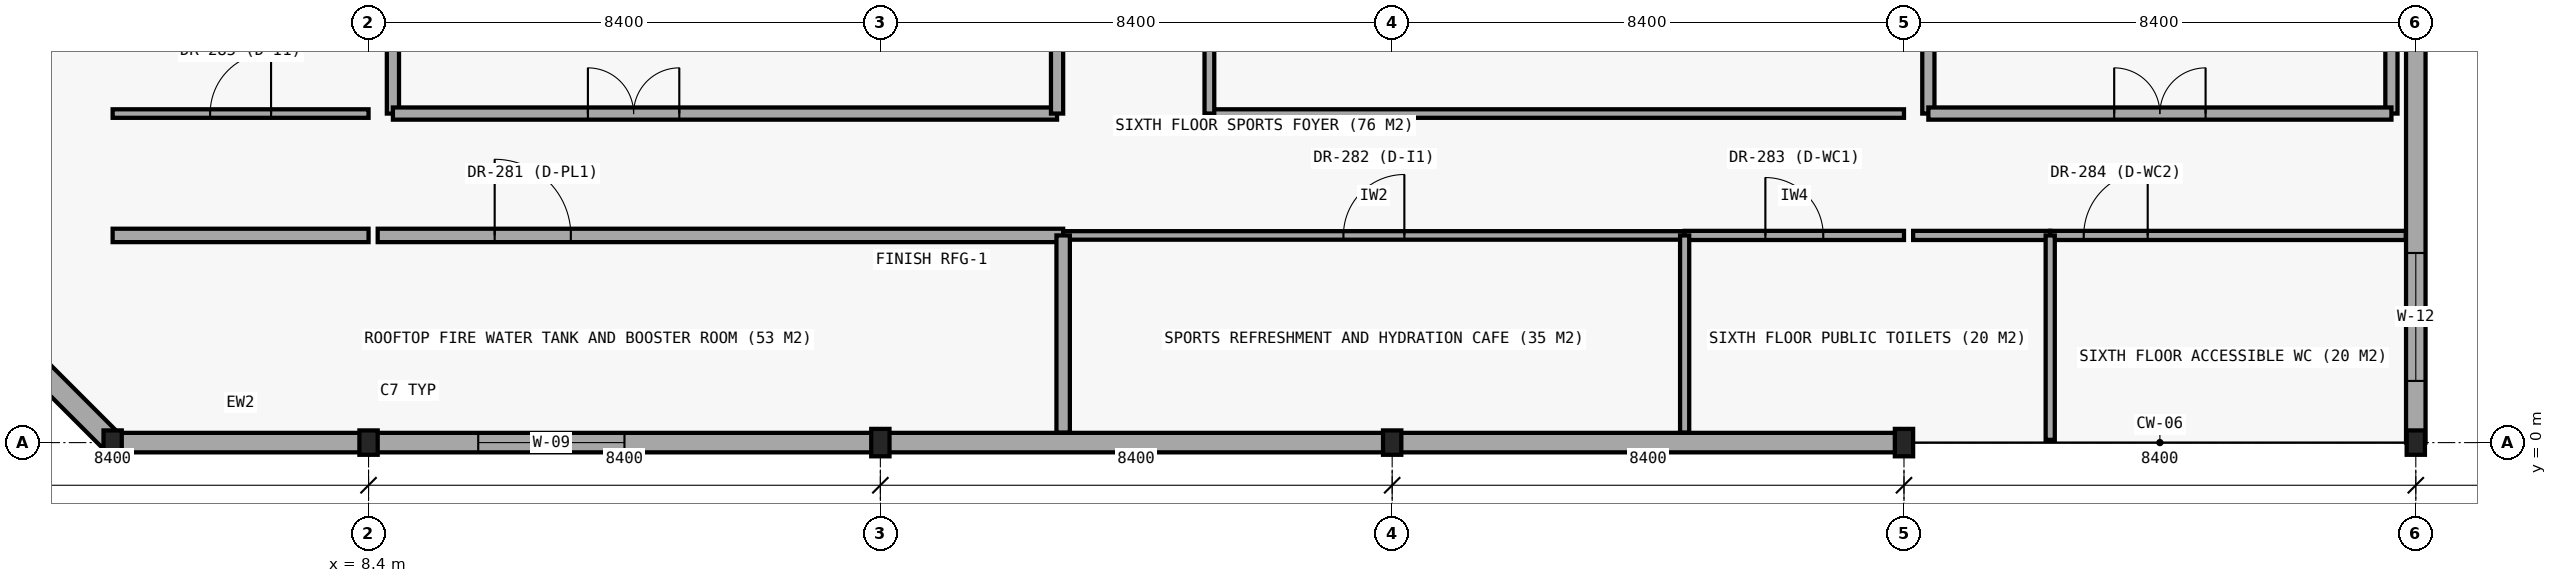
"""IFC4 building model, lengths in metres.
Left out: names, types, materials, properties, quantities, classifications, styles, units other than length and angle.
Written with IfcOpenShell. Run it as: python <this file> out.ifc"""

import sys

from ifc_helpers import new_model, si_unit, direction, frame, frame_2d, origin, origin_2d, place, context, subcontext, project, spatial, rectangle, i_section, extrude, element, fill, save


model = new_model("IFC4")
c1 = context("Model", 3, precision=1e-05, world=origin(), true_north=direction((0.0, 1.0)))
c2 = subcontext(c1, "Body", "Model", "MODEL_VIEW")
j1 = project(units=[si_unit("LENGTHUNIT", "METRE"), si_unit("PLANEANGLEUNIT", "RADIAN")], contexts=[c1])
p1 = place(None, origin())
s1 = spatial("IfcSite", under=j1, at=p1, CompositionType="ELEMENT")
p2 = place(p1, origin())
s2 = spatial("IfcBuilding", under=s1, at=p2, CompositionType="ELEMENT")
p3 = place(p2, frame((0.0, 0.0, 26.4)))
s3 = spatial("IfcBuildingStorey", under=s2, at=p3, CompositionType="ELEMENT", Elevation=26.4)
p4 = place(p3, frame((8.4, 0.0, 0.0), z_axis=(0.0, 0.0, 1.0), x_axis=(1.0, 0.0, 0.0)))
e1 = element("IfcColumn", 1, at=p4, inside=s3, PredefinedType="COLUMN", context=c2, shape_type="SweptSolid", body=[
    extrude(i_section(OverallWidth=0.3, OverallDepth=0.4, WebThickness=0.013, FlangeThickness=0.024, FilletRadius=0.027, at=origin_2d()), origin(), (0.0, 0.0, 1.0), 4.63),
])
p5 = place(p3, frame((16.8, 0.0, 0.0), z_axis=(0.0, 0.0, 1.0), x_axis=(1.0, 0.0, 0.0)))
e2 = element("IfcColumn", 2, at=p5, inside=s3, PredefinedType="COLUMN", context=c2, shape_type="SweptSolid", body=[
    extrude(i_section(OverallWidth=0.3, OverallDepth=0.45, WebThickness=0.014, FlangeThickness=0.026, FilletRadius=0.027, at=origin_2d()), origin(), (0.0, 0.0, 1.0), 4.63),
])
p6 = place(p3, frame((25.2, 0.0, 0.0), z_axis=(0.0, 0.0, 1.0), x_axis=(1.0, 0.0, 0.0)))
e3 = element("IfcColumn", 3, at=p6, inside=s3, PredefinedType="COLUMN", context=c2, shape_type="SweptSolid", body=[
    extrude(i_section(OverallWidth=0.3, OverallDepth=0.4, WebThickness=0.013, FlangeThickness=0.024, FilletRadius=0.027, at=origin_2d()), origin(), (0.0, 0.0, 1.0), 4.63),
])
p7 = place(p3, frame((33.6, 0.0, 0.0), z_axis=(0.0, 0.0, 1.0), x_axis=(1.0, 0.0, 0.0)))
e4 = element("IfcColumn", 4, at=p7, inside=s3, PredefinedType="COLUMN", context=c2, shape_type="SweptSolid", body=[
    extrude(i_section(OverallWidth=0.3, OverallDepth=0.45, WebThickness=0.014, FlangeThickness=0.026, FilletRadius=0.027, at=origin_2d()), origin(), (0.0, 0.0, 1.0), 4.63),
])
for number, where, z_axis, x_axis in (
    (5, (42.0, 0.0, 0.0), (0.0, 0.0, 1.0), (1.0, 0.0, 0.0)),
    (6, (4.2, 0.0, 0.0), (0.0, 0.0, 1.0), (1.0, 0.0, 0.0)),
):
    element("IfcColumn", number, at=place(p3, frame(where, z_axis=z_axis, x_axis=x_axis)), inside=s3, PredefinedType="COLUMN", context=c2, shape_type="SweptSolid", body=[
        extrude(i_section(OverallWidth=0.3, OverallDepth=0.4, WebThickness=0.013, FlangeThickness=0.024, FilletRadius=0.027, at=origin_2d()), origin(), (0.0, 0.0, 1.0), 4.63),
    ])
p8 = place(p3, frame((4.2, 0.0, 0.0), z_axis=(0.0, 0.0, 1.0), x_axis=(1.0, 0.0, 0.0)))
e7 = element("IfcWall", 7, at=p8, inside=s3, PredefinedType="STANDARD", context=c2, shape_type="SweptSolid", body=[
    extrude(rectangle(XDim=4.2, YDim=0.32, at=frame_2d((2.1, 0.0))), origin(), (0.0, 0.0, 1.0), 4.06),
])
p9 = place(p3, frame((8.4, 0.0, 0.0), z_axis=(0.0, 0.0, 1.0), x_axis=(1.0, 0.0, 0.0)))
e8 = element("IfcWall", 8, at=p9, inside=s3, PredefinedType="STANDARD", context=c2, shape_type="SweptSolid", body=[
    extrude(rectangle(XDim=8.4, YDim=0.32, at=frame_2d((4.2, 0.0))), origin(), (0.0, 0.0, 1.0), 4.06),
])
p10 = place(p9, frame((1.8, 0.0, 0.85)))
e9 = element("IfcOpeningElement", 9, at=p10, cuts=e8, PredefinedType="OPENING", context=c2, shape_type="SweptSolid", body=[
    extrude(rectangle(XDim=2.4, YDim=2.6, at=frame_2d((1.2, 1.3))), frame((0.0, 0.17, 0.0), z_axis=(0.0, -1.0, 0.0), x_axis=(1.0, 0.0, 0.0)), (0.0, 0.0, 1.0), 0.34),
])
p11 = place(p3, frame((16.8, 0.0, 0.0), z_axis=(0.0, 0.0, 1.0), x_axis=(1.0, 0.0, 0.0)))
e10 = element("IfcWall", 10, at=p11, inside=s3, PredefinedType="STANDARD", context=c2, shape_type="SweptSolid", body=[
    extrude(rectangle(XDim=8.4, YDim=0.32, at=frame_2d((4.2, 0.0))), origin(), (0.0, 0.0, 1.0), 4.01),
])
p12 = place(p3, frame((25.2, 0.0, 0.0), z_axis=(0.0, 0.0, 1.0), x_axis=(1.0, 0.0, 0.0)))
e11 = element("IfcWall", 11, at=p12, inside=s3, PredefinedType="STANDARD", context=c2, shape_type="SweptSolid", body=[
    extrude(rectangle(XDim=8.4, YDim=0.32, at=frame_2d((4.2, 0.0))), origin(), (0.0, 0.0, 1.0), 4.06),
])
p13 = place(p3, frame((42.0, 0.0, 0.0), z_axis=(0.0, 0.0, 1.0), x_axis=(0.0, 1.0, 0.0)))
e12 = element("IfcWall", 12, at=p13, inside=s3, PredefinedType="STANDARD", context=c2, shape_type="SweptSolid", body=[
    extrude(rectangle(XDim=8.4, YDim=0.32, at=frame_2d((4.2, 0.0))), origin(), (0.0, 0.0, 1.0), 4.06),
])
p14 = place(p13, frame((1.012, 0.0, 0.9)))
e13 = element("IfcOpeningElement", 13, at=p14, cuts=e12, PredefinedType="OPENING", context=c2, shape_type="SweptSolid", body=[
    extrude(rectangle(XDim=2.1, YDim=2.1, at=frame_2d((1.05, 1.05))), frame((0.0, 0.17, 0.0), z_axis=(0.0, -1.0, 0.0), x_axis=(1.0, 0.0, 0.0)), (0.0, 0.0, 1.0), 0.34),
])
p15 = place(p3, frame((0.0, 4.2, 0.0), z_axis=(0.0, 0.0, 1.0), x_axis=(0.707106781187, -0.707106781187, 0.0)))
e14 = element("IfcWall", 14, at=p15, inside=s3, PredefinedType="STANDARD", context=c2, shape_type="SweptSolid", body=[
    extrude(rectangle(XDim=5.94, YDim=0.36, at=frame_2d((2.97, 0.0))), origin(), (0.0, 0.0, 1.0), 4.06),
])
p16 = place(p15, frame((2.5, 0.0, 1.0)))
e15 = element("IfcOpeningElement", 15, at=p16, cuts=e14, PredefinedType="OPENING", context=c2, shape_type="SweptSolid", body=[
    extrude(rectangle(XDim=0.75, YDim=1.5, at=frame_2d((0.375, 0.75))), frame((0.0, 0.19, 0.0), z_axis=(0.0, -1.0, 0.0), x_axis=(1.0, 0.0, 0.0)), (0.0, 0.0, 1.0), 0.38),
])
p17 = place(p3, frame((8.8, 5.4, 0.0), z_axis=(0.0, 0.0, 1.0), x_axis=(0.0, 1.0, 0.0)))
e16 = element("IfcWall", 16, at=p17, inside=s3, PredefinedType="PARTITIONING", context=c2, shape_type="SweptSolid", body=[
    extrude(rectangle(XDim=2.85, YDim=0.2, at=frame_2d((1.425, 0.0))), origin(), (0.0, 0.0, 1.0), 4.12),
])
p18 = place(p3, frame((8.8, 5.4, 0.0), z_axis=(0.0, 0.0, 1.0), x_axis=(1.0, 0.0, 0.0)))
e17 = element("IfcWall", 17, at=p18, inside=s3, PredefinedType="PARTITIONING", context=c2, shape_type="SweptSolid", body=[
    extrude(rectangle(XDim=10.9, YDim=0.2, at=frame_2d((5.45, 0.0))), origin(), (0.0, 0.0, 1.0), 4.12),
])
p19 = place(p18, frame((3.2, 0.0, 0.0)))
e18 = element("IfcOpeningElement", 18, at=p19, cuts=e17, PredefinedType="OPENING", context=c2, shape_type="SweptSolid", body=[
    extrude(rectangle(XDim=1.5, YDim=2.2, at=frame_2d((0.75, 1.1))), frame((0.0, 0.11, 0.0), z_axis=(0.0, -1.0, 0.0), x_axis=(1.0, 0.0, 0.0)), (0.0, 0.0, 1.0), 0.22),
])
p20 = place(p3, frame((19.7, 5.4, 0.0), z_axis=(0.0, 0.0, 1.0), x_axis=(0.0, 1.0, 0.0)))
e19 = element("IfcWall", 19, at=p20, inside=s3, PredefinedType="PARTITIONING", context=c2, shape_type="SweptSolid", body=[
    extrude(rectangle(XDim=9.6, YDim=0.2, at=frame_2d((4.8, 0.0))), origin(), (0.0, 0.0, 1.0), 4.12),
])
for number, where, z_axis, x_axis in (
    (20, (34.0, 5.4, 0.0), (0.0, 0.0, 1.0), (0.0, 1.0, 0.0)),
    (21, (41.6, 5.4, 0.0), (0.0, 0.0, 1.0), (0.0, 1.0, 0.0)),
):
    element("IfcWall", number, at=place(p3, frame(where, z_axis=z_axis, x_axis=x_axis)), inside=s3, PredefinedType="PARTITIONING", context=c2, shape_type="SweptSolid", body=[
        extrude(rectangle(XDim=2.85, YDim=0.2, at=frame_2d((1.425, 0.0))), origin(), (0.0, 0.0, 1.0), 4.06),
    ])
p21 = place(p3, frame((34.0, 5.4, 0.0), z_axis=(0.0, 0.0, 1.0), x_axis=(1.0, 0.0, 0.0)))
e22 = element("IfcWall", 22, at=p21, inside=s3, PredefinedType="PARTITIONING", context=c2, shape_type="SweptSolid", body=[
    extrude(rectangle(XDim=7.6, YDim=0.2, at=frame_2d((3.8, 0.0))), origin(), (0.0, 0.0, 1.0), 4.12),
])
p22 = place(p21, frame((3.05, 0.0, 0.0)))
e23 = element("IfcOpeningElement", 23, at=p22, cuts=e22, PredefinedType="OPENING", context=c2, shape_type="SweptSolid", body=[
    extrude(rectangle(XDim=1.5, YDim=2.2, at=frame_2d((0.75, 1.1))), frame((0.0, 0.11, 0.0), z_axis=(0.0, -1.0, 0.0), x_axis=(1.0, 0.0, 0.0)), (0.0, 0.0, 1.0), 0.22),
])
p23 = place(p3, frame((4.2, 3.4, 0.0), z_axis=(0.0, 0.0, 1.0), x_axis=(1.0, 0.0, 0.0)))
e24 = element("IfcWall", 24, at=p23, inside=s3, PredefinedType="PARTITIONING", context=c2, shape_type="SweptSolid", body=[
    extrude(rectangle(XDim=4.2, YDim=0.22, at=frame_2d((2.1, 0.0))), origin(), (0.0, 0.0, 1.0), 4.1),
])
p24 = place(p3, frame((8.55, 3.4, 0.0), z_axis=(0.0, 0.0, 1.0), x_axis=(1.0, 0.0, 0.0)))
e25 = element("IfcWall", 25, at=p24, inside=s3, PredefinedType="PARTITIONING", context=c2, shape_type="SweptSolid", body=[
    extrude(rectangle(XDim=11.25, YDim=0.22, at=frame_2d((5.625, 0.0))), origin(), (0.0, 0.0, 1.0), 4.1),
])
p25 = place(p24, frame((1.92, 0.0, 0.0)))
e26 = element("IfcOpeningElement", 26, at=p25, cuts=e25, PredefinedType="OPENING", context=c2, shape_type="SweptSolid", body=[
    extrude(rectangle(XDim=1.25, YDim=2.2, at=frame_2d((0.625, 1.1))), frame((0.0, 0.12, 0.0), z_axis=(0.0, -1.0, 0.0), x_axis=(1.0, 0.0, 0.0)), (0.0, 0.0, 1.0), 0.24),
])
p26 = place(p3, frame((19.8, 3.4, 0.0), z_axis=(0.0, 0.0, 1.0), x_axis=(1.0, 0.0, 0.0)))
e27 = element("IfcWall", 27, at=p26, inside=s3, PredefinedType="PARTITIONING", context=c2, shape_type="SweptSolid", body=[
    extrude(rectangle(XDim=10.2, YDim=0.14, at=frame_2d((5.1, 0.0))), origin(), (0.0, 0.0, 1.0), 4.1),
])
p27 = place(p26, frame((4.6, 0.0, 0.0)))
e28 = element("IfcOpeningElement", 28, at=p27, cuts=e27, PredefinedType="OPENING", context=c2, shape_type="SweptSolid", body=[
    extrude(rectangle(XDim=1.0, YDim=2.15, at=frame_2d((0.5, 1.075))), frame((0.0, 0.08, 0.0), z_axis=(0.0, -1.0, 0.0), x_axis=(1.0, 0.0, 0.0)), (0.0, 0.0, 1.0), 0.16),
])
p28 = place(p3, frame((30.0, 3.4, 0.0), z_axis=(0.0, 0.0, 1.0), x_axis=(1.0, 0.0, 0.0)))
e29 = element("IfcWall", 29, at=p28, inside=s3, PredefinedType="PARTITIONING", context=c2, shape_type="SweptSolid", body=[
    extrude(rectangle(XDim=3.6, YDim=0.15, at=frame_2d((1.8, 0.0))), origin(), (0.0, 0.0, 1.0), 4.1),
])
p29 = place(p28, frame((1.325, 0.0, 0.0)))
e30 = element("IfcOpeningElement", 30, at=p29, cuts=e29, PredefinedType="OPENING", context=c2, shape_type="SweptSolid", body=[
    extrude(rectangle(XDim=0.95, YDim=2.1, at=frame_2d((0.475, 1.05))), frame((0.0, 0.085, 0.0), z_axis=(0.0, -1.0, 0.0), x_axis=(1.0, 0.0, 0.0)), (0.0, 0.0, 1.0), 0.17),
])
p30 = place(p3, frame((33.75, 3.4, 0.0), z_axis=(0.0, 0.0, 1.0), x_axis=(1.0, 0.0, 0.0)))
e31 = element("IfcWall", 31, at=p30, inside=s3, PredefinedType="PARTITIONING", context=c2, shape_type="SweptSolid", body=[
    extrude(rectangle(XDim=2.25, YDim=0.15, at=frame_2d((1.125, 0.0))), origin(), (0.0, 0.0, 1.0), 4.1),
])
p31 = place(p3, frame((36.0, 3.4, 0.0), z_axis=(0.0, 0.0, 1.0), x_axis=(1.0, 0.0, 0.0)))
e32 = element("IfcWall", 32, at=p31, inside=s3, PredefinedType="PARTITIONING", context=c2, shape_type="SweptSolid", body=[
    extrude(rectangle(XDim=5.835, YDim=0.15, at=frame_2d((2.917, 0.0))), origin(), (0.0, 0.0, 1.0), 4.1),
])
p32 = place(p31, frame((0.55, 0.0, 0.0)))
e33 = element("IfcOpeningElement", 33, at=p32, cuts=e32, PredefinedType="OPENING", context=c2, shape_type="SweptSolid", body=[
    extrude(rectangle(XDim=1.05, YDim=2.15, at=frame_2d((0.525, 1.075))), frame((0.0, 0.085, 0.0), z_axis=(0.0, -1.0, 0.0), x_axis=(1.0, 0.0, 0.0)), (0.0, 0.0, 1.0), 0.17),
])
p33 = place(p3, frame((4.2, 5.4, 0.0), z_axis=(0.0, 0.0, 1.0), x_axis=(1.0, 0.0, 0.0)))
e34 = element("IfcWall", 34, at=p33, inside=s3, PredefinedType="PARTITIONING", context=c2, shape_type="SweptSolid", body=[
    extrude(rectangle(XDim=4.2, YDim=0.14, at=frame_2d((2.1, 0.0))), origin(), (0.0, 0.0, 1.0), 4.1),
])
p34 = place(p33, frame((1.6, 0.0, 0.0)))
e35 = element("IfcOpeningElement", 35, at=p34, cuts=e34, PredefinedType="OPENING", context=c2, shape_type="SweptSolid", body=[
    extrude(rectangle(XDim=1.0, YDim=2.15, at=frame_2d((0.5, 1.075))), frame((0.0, 0.08, 0.0), z_axis=(0.0, -1.0, 0.0), x_axis=(1.0, 0.0, 0.0)), (0.0, 0.0, 1.0), 0.16),
])
p35 = place(p3, frame((22.2, 5.4, 0.0), z_axis=(0.0, 0.0, 1.0), x_axis=(1.0, 0.0, 0.0)))
e36 = element("IfcWall", 36, at=p35, inside=s3, PredefinedType="PARTITIONING", context=c2, shape_type="SweptSolid", body=[
    extrude(rectangle(XDim=11.4, YDim=0.14, at=frame_2d((5.7, 0.0))), origin(), (0.0, 0.0, 1.0), 4.1),
])
p36 = place(p3, frame((19.8, 0.165, 0.0), z_axis=(0.0, 0.0, 1.0), x_axis=(0.0, 1.0, 0.0)))
e37 = element("IfcWall", 37, at=p36, inside=s3, PredefinedType="PARTITIONING", context=c2, shape_type="SweptSolid", body=[
    extrude(rectangle(XDim=3.235, YDim=0.22, at=frame_2d((1.617, 0.0))), origin(), (0.0, 0.0, 1.0), 4.1),
])
p37 = place(p3, frame((22.2, 5.4, 0.0), z_axis=(0.0, 0.0, 1.0), x_axis=(0.0, 1.0, 0.0)))
e38 = element("IfcWall", 38, at=p37, inside=s3, PredefinedType="PARTITIONING", context=c2, shape_type="SweptSolid", body=[
    extrude(rectangle(XDim=16.6, YDim=0.16, at=frame_2d((8.3, 0.0))), origin(), (0.0, 0.0, 1.0), 4.1),
])
p38 = place(p37, frame((4.72, 0.0, 0.0)))
e39 = element("IfcOpeningElement", 39, at=p38, cuts=e38, PredefinedType="OPENING", context=c2, shape_type="SweptSolid", body=[
    extrude(rectangle(XDim=1.0, YDim=2.15, at=frame_2d((0.5, 1.075))), frame((0.0, 0.09, 0.0), z_axis=(0.0, -1.0, 0.0), x_axis=(1.0, 0.0, 0.0)), (0.0, 0.0, 1.0), 0.18),
])
p39 = place(p3, frame((30.0, 0.165, 0.0), z_axis=(0.0, 0.0, 1.0), x_axis=(0.0, 1.0, 0.0)))
e40 = element("IfcWall", 40, at=p39, inside=s3, PredefinedType="PARTITIONING", context=c2, shape_type="SweptSolid", body=[
    extrude(rectangle(XDim=3.235, YDim=0.15, at=frame_2d((1.617, 0.0))), origin(), (0.0, 0.0, 1.0), 4.1),
])
p40 = place(p3, frame((36.0, 0.045, 0.0), z_axis=(0.0, 0.0, 1.0), x_axis=(0.0, 1.0, 0.0)))
e41 = element("IfcWall", 41, at=p40, inside=s3, PredefinedType="PARTITIONING", context=c2, shape_type="SweptSolid", body=[
    extrude(rectangle(XDim=3.355, YDim=0.15, at=frame_2d((1.677, 0.0))), origin(), (0.0, 0.0, 1.0), 4.1),
])
p41 = place(p10, origin())
e42 = element("IfcWindow", 42, at=p41, inside=s3, PartitioningType="SINGLE_PANEL", PredefinedType="WINDOW", context=c2, shape_type="SweptSolid", body=[
    extrude(rectangle(XDim=2.4, YDim=2.6, at=frame_2d((1.2, 1.3))), frame((0.0, 0.03, 0.0), z_axis=(0.0, -1.0, 0.0), x_axis=(1.0, 0.0, 0.0)), (0.0, 0.0, 1.0), 0.06),
])
fill(e9, e42)
p42 = place(p14, origin())
e43 = element("IfcWindow", 43, at=p42, inside=s3, PartitioningType="SINGLE_PANEL", PredefinedType="WINDOW", context=c2, shape_type="SweptSolid", body=[
    extrude(rectangle(XDim=2.1, YDim=2.1, at=frame_2d((1.05, 1.05))), frame((0.0, 0.03, 0.0), z_axis=(0.0, -1.0, 0.0), x_axis=(1.0, 0.0, 0.0)), (0.0, 0.0, 1.0), 0.06),
])
fill(e13, e43)
p43 = place(p19, origin())
e44 = element("IfcDoor", 44, at=p43, inside=s3, OperationType="DOUBLE_DOOR_SINGLE_SWING", PredefinedType="DOOR", context=c2, shape_type="SweptSolid", body=[
    extrude(rectangle(XDim=1.5, YDim=2.2, at=frame_2d((0.75, 1.1))), frame((0.0, 0.025, 0.0), z_axis=(0.0, -1.0, 0.0), x_axis=(1.0, 0.0, 0.0)), (0.0, 0.0, 1.0), 0.05),
])
fill(e18, e44)
p44 = place(p22, origin())
e45 = element("IfcDoor", 45, at=p44, inside=s3, OperationType="DOUBLE_DOOR_SINGLE_SWING", PredefinedType="DOOR", context=c2, shape_type="SweptSolid", body=[
    extrude(rectangle(XDim=1.5, YDim=2.2, at=frame_2d((0.75, 1.1))), frame((0.0, 0.025, 0.0), z_axis=(0.0, -1.0, 0.0), x_axis=(1.0, 0.0, 0.0)), (0.0, 0.0, 1.0), 0.05),
])
fill(e23, e45)
p45 = place(p25, origin())
e46 = element("IfcDoor", 46, at=p45, inside=s3, OperationType="SINGLE_SWING_LEFT", PredefinedType="DOOR", context=c2, shape_type="SweptSolid", body=[
    extrude(rectangle(XDim=1.25, YDim=2.2, at=frame_2d((0.625, 1.1))), frame((0.0, 0.025, 0.0), z_axis=(0.0, -1.0, 0.0), x_axis=(1.0, 0.0, 0.0)), (0.0, 0.0, 1.0), 0.05),
])
fill(e26, e46)
p46 = place(p27, origin())
e47 = element("IfcDoor", 47, at=p46, inside=s3, OperationType="SINGLE_SWING_RIGHT", PredefinedType="DOOR", context=c2, shape_type="SweptSolid", body=[
    extrude(rectangle(XDim=1.0, YDim=2.15, at=frame_2d((0.5, 1.075))), frame((0.0, 0.025, 0.0), z_axis=(0.0, -1.0, 0.0), x_axis=(1.0, 0.0, 0.0)), (0.0, 0.0, 1.0), 0.05),
])
fill(e28, e47)
p47 = place(p29, origin())
e48 = element("IfcDoor", 48, at=p47, inside=s3, OperationType="SINGLE_SWING_LEFT", PredefinedType="DOOR", context=c2, shape_type="SweptSolid", body=[
    extrude(rectangle(XDim=0.95, YDim=2.1, at=frame_2d((0.475, 1.05))), frame((0.0, 0.025, 0.0), z_axis=(0.0, -1.0, 0.0), x_axis=(1.0, 0.0, 0.0)), (0.0, 0.0, 1.0), 0.05),
])
fill(e30, e48)
p48 = place(p32, origin())
e49 = element("IfcDoor", 49, at=p48, inside=s3, OperationType="SINGLE_SWING_RIGHT", PredefinedType="DOOR", context=c2, shape_type="SweptSolid", body=[
    extrude(rectangle(XDim=1.05, YDim=2.15, at=frame_2d((0.525, 1.075))), frame((0.0, 0.025, 0.0), z_axis=(0.0, -1.0, 0.0), x_axis=(1.0, 0.0, 0.0)), (0.0, 0.0, 1.0), 0.05),
])
fill(e33, e49)
p49 = place(p34, origin())
e50 = element("IfcDoor", 50, at=p49, inside=s3, OperationType="SINGLE_SWING_RIGHT", PredefinedType="DOOR", context=c2, shape_type="SweptSolid", body=[
    extrude(rectangle(XDim=1.0, YDim=2.15, at=frame_2d((0.5, 1.075))), frame((0.0, 0.025, 0.0), z_axis=(0.0, -1.0, 0.0), x_axis=(1.0, 0.0, 0.0)), (0.0, 0.0, 1.0), 0.05),
])
fill(e35, e50)
save(model, sys.argv[1])
